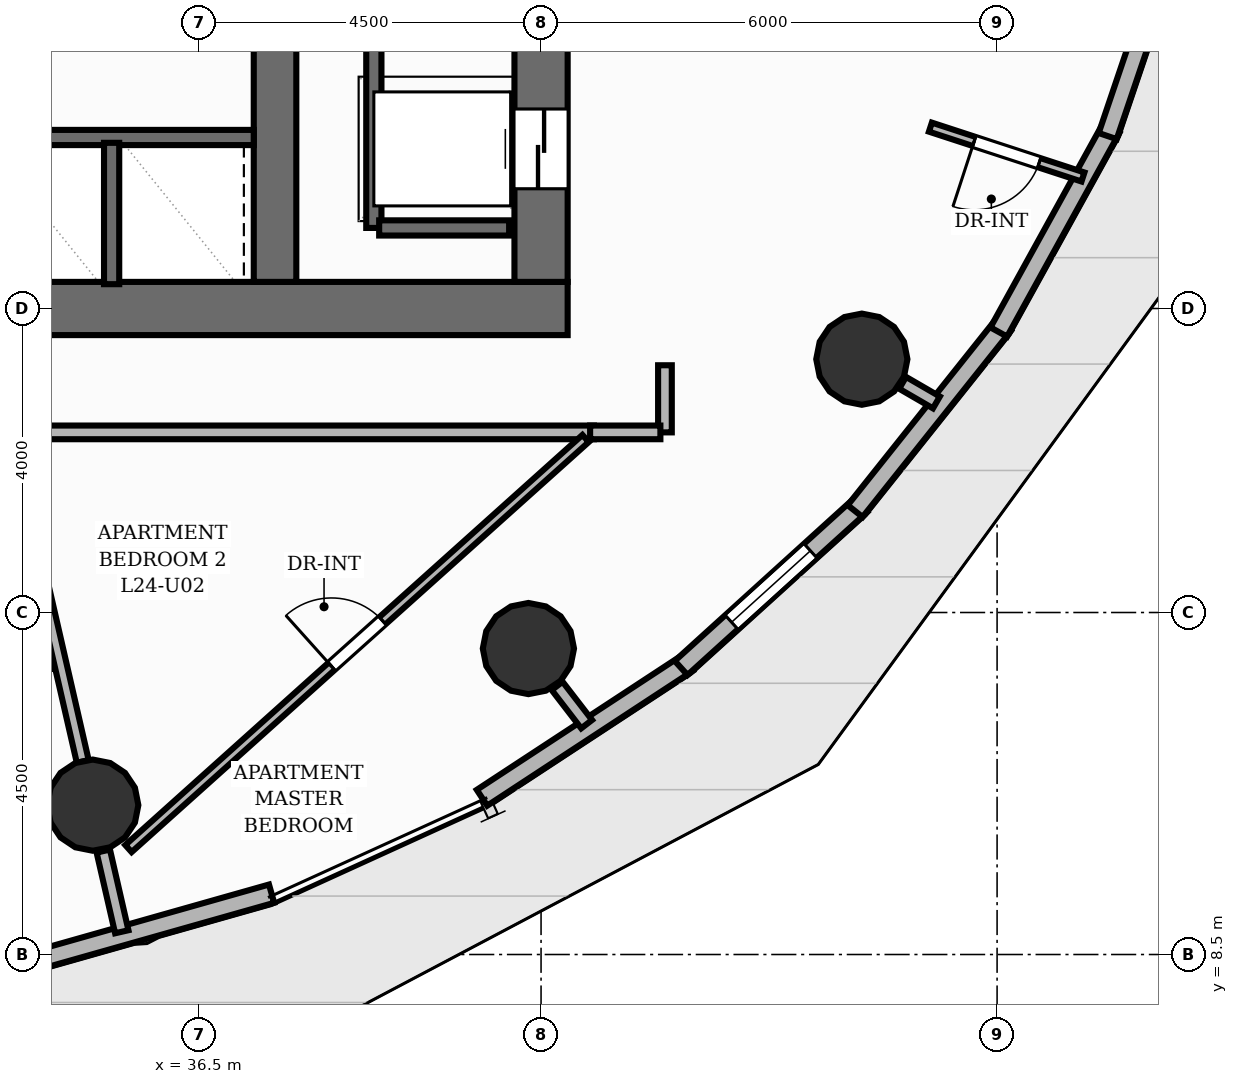
"""IFC4 building model, lengths in metres.
Left out: names, types, materials, properties, quantities, classifications, styles, units other than length and angle.
Written with IfcOpenShell. Run it as: python <this file> out.ifc"""

import sys

from ifc_helpers import new_model, si_unit, direction, frame, frame_2d, origin, origin_2d, place, context, subcontext, project, spatial, rectangle, circle, extrude, element, fill, save


model = new_model("IFC4")
c1 = context("Model", 3, precision=1e-05, world=origin(), true_north=direction((0.0, 1.0)))
c2 = subcontext(c1, "Body", "Model", "MODEL_VIEW")
j1 = project(units=[si_unit("LENGTHUNIT", "METRE"), si_unit("PLANEANGLEUNIT", "RADIAN")], contexts=[c1])
p1 = place(None, origin())
s1 = spatial("IfcSite", under=j1, at=p1, CompositionType="ELEMENT")
p2 = place(p1, origin())
s2 = spatial("IfcBuilding", under=s1, at=p2, CompositionType="ELEMENT")
p3 = place(p2, frame((0.0, 0.0, 83.68)))
s3 = spatial("IfcBuildingStorey", under=s2, at=p3, CompositionType="ELEMENT", Elevation=83.68)
p4 = place(p3, frame((22.65, 17.0, 0.0), z_axis=(0.0, 0.0, 1.0), x_axis=(1.0, 0.0, 0.0)))
e1 = element("IfcWall", 1, at=p4, inside=s3, PredefinedType="SHEAR", context=c2, shape_type="SweptSolid", body=[
    extrude(rectangle(XDim=18.7, YDim=0.7, at=frame_2d((9.35, 0.0))), origin(), (0.0, 0.0, 1.0), 3.2),
])
p5 = place(p4, frame((5.85, 0.0, 0.0)))
e2 = element("IfcOpeningElement", 2, at=p5, cuts=e1, PredefinedType="OPENING", context=c2, shape_type="SweptSolid", body=[
    extrude(rectangle(XDim=1.1, YDim=2.15, at=frame_2d((0.55, 1.075))), frame((0.0, 0.36, 0.0), z_axis=(0.0, -1.0, 0.0), x_axis=(1.0, 0.0, 0.0)), (0.0, 0.0, 1.0), 0.72),
])
p6 = place(p4, frame((9.4, 0.0, 0.0)))
e3 = element("IfcOpeningElement", 3, at=p6, cuts=e1, PredefinedType="OPENING", context=c2, shape_type="SweptSolid", body=[
    extrude(rectangle(XDim=0.9, YDim=2.1, at=frame_2d((0.45, 1.05))), frame((0.0, 0.36, 0.0), z_axis=(0.0, -1.0, 0.0), x_axis=(1.0, 0.0, 0.0)), (0.0, 0.0, 1.0), 0.72),
])
p7 = place(p3, frame((41.0, 17.35, 0.0), z_axis=(0.0, 0.0, 1.0), x_axis=(0.0, 1.0, 0.0)))
e4 = element("IfcWall", 4, at=p7, inside=s3, PredefinedType="SHEAR", context=c2, shape_type="SweptSolid", body=[
    extrude(rectangle(XDim=13.3, YDim=0.7, at=frame_2d((6.65, 0.0))), origin(), (0.0, 0.0, 1.0), 3.2),
])
p8 = place(p7, frame((1.225, 0.0, 0.0)))
e5 = element("IfcOpeningElement", 5, at=p8, cuts=e4, PredefinedType="OPENING", context=c2, shape_type="SweptSolid", body=[
    extrude(rectangle(XDim=1.05, YDim=2.15, at=frame_2d((0.525, 1.075))), frame((0.0, 0.36, 0.0), z_axis=(0.0, -1.0, 0.0), x_axis=(1.0, 0.0, 0.0)), (0.0, 0.0, 1.0), 0.72),
])
p9 = place(p7, frame((4.475, 0.0, 0.0)))
e6 = element("IfcOpeningElement", 6, at=p9, cuts=e4, PredefinedType="OPENING", context=c2, shape_type="SweptSolid", body=[
    extrude(rectangle(XDim=1.05, YDim=2.15, at=frame_2d((0.525, 1.075))), frame((0.0, 0.36, 0.0), z_axis=(0.0, -1.0, 0.0), x_axis=(1.0, 0.0, 0.0)), (0.0, 0.0, 1.0), 0.72),
])
p10 = place(p7, frame((7.775, 0.0, 0.0)))
e7 = element("IfcOpeningElement", 7, at=p10, cuts=e4, PredefinedType="OPENING", context=c2, shape_type="SweptSolid", body=[
    extrude(rectangle(XDim=1.05, YDim=2.15, at=frame_2d((0.525, 1.075))), frame((0.0, 0.36, 0.0), z_axis=(0.0, -1.0, 0.0), x_axis=(1.0, 0.0, 0.0)), (0.0, 0.0, 1.0), 0.72),
])
p11 = place(p7, frame((11.025, 0.0, 0.0)))
e8 = element("IfcOpeningElement", 8, at=p11, cuts=e4, PredefinedType="OPENING", context=c2, shape_type="SweptSolid", body=[
    extrude(rectangle(XDim=1.05, YDim=2.15, at=frame_2d((0.525, 1.075))), frame((0.0, 0.36, 0.0), z_axis=(0.0, -1.0, 0.0), x_axis=(1.0, 0.0, 0.0)), (0.0, 0.0, 1.0), 0.72),
])
p12 = place(p3, frame((37.5, 17.35, 0.0), z_axis=(0.0, 0.0, 1.0), x_axis=(0.0, 1.0, 0.0)))
e9 = element("IfcWall", 9, at=p12, inside=s3, PredefinedType="SHEAR", context=c2, shape_type="SweptSolid", body=[
    extrude(rectangle(XDim=13.3, YDim=0.56, at=frame_2d((6.65, 0.0))), origin(), (0.0, 0.0, 1.0), 3.2),
])
for number, where, z_axis, x_axis in (
    (10, (35.102, 10.465, 0.0), (0.0, 0.0, 1.0), (1.0, 0.0, 0.0)),
    (11, (40.833, 12.526, 0.0), (0.0, 0.0, 1.0), (1.0, 0.0, 0.0)),
    (12, (45.22, 16.333, 0.0), (0.0, 0.0, 1.0), (1.0, 0.0, 0.0)),
):
    element("IfcColumn", number, at=place(p3, frame(where, z_axis=z_axis, x_axis=x_axis)), inside=s3, PredefinedType="COLUMN", context=c2, shape_type="SweptSolid", body=[
        extrude(circle(Radius=0.6, at=origin_2d()), origin(), (0.0, 0.0, 1.0), 3.2),
    ])
p13 = place(p3, frame((37.455, 9.301, 0.0), z_axis=(0.0, 0.0, 1.0), x_axis=(-0.962134911526, -0.272573681825, 0.0)))
e13 = element("IfcWall", 13, at=p13, inside=s3, PredefinedType="SOLIDWALL", context=c2, shape_type="SweptSolid", body=[
    extrude(rectangle(XDim=3.26, YDim=0.25, at=frame_2d((1.63, 0.0))), origin(), (0.0, 0.0, 1.0), 2.96),
])
p14 = place(p3, frame((42.929, 12.337, 0.0), z_axis=(0.0, 0.0, 1.0), x_axis=(-0.836273856728, -0.548311988336, 0.0)))
e14 = element("IfcWall", 14, at=p14, inside=s3, PredefinedType="SOLIDWALL", context=c2, shape_type="SweptSolid", body=[
    extrude(rectangle(XDim=3.236, YDim=0.25, at=frame_2d((1.618, 0.0))), origin(), (0.0, 0.0, 1.0), 2.96),
])
p15 = place(p3, frame((45.208, 14.414, 0.0), z_axis=(0.0, 0.0, 1.0), x_axis=(-0.740832321657, -0.671690011232, 0.0)))
e15 = element("IfcWall", 15, at=p15, inside=s3, PredefinedType="SOLIDWALL", context=c2, shape_type="SweptSolid", body=[
    extrude(rectangle(XDim=3.192, YDim=0.25, at=frame_2d((1.596, 0.0))), origin(), (0.0, 0.0, 1.0), 2.96),
])
p16 = place(p15, frame((0.896, 0.0, 0.85)))
e16 = element("IfcOpeningElement", 16, at=p16, cuts=e15, PredefinedType="OPENING", context=c2, shape_type="SweptSolid", body=[
    extrude(rectangle(XDim=1.4, YDim=1.55, at=frame_2d((0.7, 0.775))), frame((0.0, 0.135, 0.0), z_axis=(0.0, -1.0, 0.0), x_axis=(1.0, 0.0, 0.0)), (0.0, 0.0, 1.0), 0.27),
])
p17 = place(p3, frame((47.084, 16.783, 0.0), z_axis=(0.0, 0.0, 1.0), x_axis=(-0.623134406496, -0.782114768714, 0.0)))
e17 = element("IfcWall", 17, at=p17, inside=s3, PredefinedType="SOLIDWALL", context=c2, shape_type="SweptSolid", body=[
    extrude(rectangle(XDim=3.131, YDim=0.25, at=frame_2d((1.565, 0.0))), origin(), (0.0, 0.0, 1.0), 2.96),
])
p18 = place(p3, frame((48.5, 19.371, 0.0), z_axis=(0.0, 0.0, 1.0), x_axis=(-0.482904421948, -0.875673066426, 0.0)))
e18 = element("IfcWall", 18, at=p18, inside=s3, PredefinedType="SOLIDWALL", context=c2, shape_type="SweptSolid", body=[
    extrude(rectangle(XDim=3.061, YDim=0.25, at=frame_2d((1.53, 0.0))), origin(), (0.0, 0.0, 1.0), 2.96),
])
p19 = place(p3, frame((49.415, 22.099, 0.0), z_axis=(0.0, 0.0, 1.0), x_axis=(-0.321149814784, -0.947028403198, 0.0)))
e19 = element("IfcWall", 19, at=p19, inside=s3, PredefinedType="SOLIDWALL", context=c2, shape_type="SweptSolid", body=[
    extrude(rectangle(XDim=2.988, YDim=0.25, at=frame_2d((1.494, 0.0))), origin(), (0.0, 0.0, 1.0), 2.96),
])
p20 = place(p3, frame((38.8, 18.06, 0.0), z_axis=(0.0, 0.0, 1.0), x_axis=(0.0, 1.0, 0.0)))
e20 = element("IfcWall", 20, at=p20, inside=s3, PredefinedType="SHEAR", context=c2, shape_type="SweptSolid", body=[
    extrude(rectangle(XDim=11.88, YDim=0.2, at=frame_2d((5.94, 0.0))), origin(), (0.0, 0.0, 1.0), 3.2),
])
p21 = place(p3, frame((38.87, 18.06, 0.0), z_axis=(0.0, 0.0, 1.0), x_axis=(1.0, 0.0, 0.0)))
e21 = element("IfcWall", 21, at=p21, inside=s3, PredefinedType="SHEAR", context=c2, shape_type="SweptSolid", body=[
    extrude(rectangle(XDim=1.71, YDim=0.2, at=frame_2d((0.855, 0.0))), origin(), (0.0, 0.0, 1.0), 3.2),
])
p22 = place(p3, frame((33.5, 19.25, 0.0), z_axis=(0.0, 0.0, 1.0), x_axis=(1.0, 0.0, 0.0)))
e22 = element("IfcWall", 22, at=p22, inside=s3, PredefinedType="SHEAR", context=c2, shape_type="SweptSolid", body=[
    extrude(rectangle(XDim=3.72, YDim=0.2, at=frame_2d((1.86, 0.0))), origin(), (0.0, 0.0, 1.0), 3.2),
])
p23 = place(p3, frame((35.35, 17.32, 0.0), z_axis=(0.0, 0.0, 1.0), x_axis=(0.0, 1.0, 0.0)))
e23 = element("IfcWall", 23, at=p23, inside=s3, PredefinedType="SHEAR", context=c2, shape_type="SweptSolid", body=[
    extrude(rectangle(XDim=1.86, YDim=0.2, at=frame_2d((0.93, 0.0))), origin(), (0.0, 0.0, 1.0), 3.2),
])
p24 = place(p3, frame((35.24, 9.861, 0.0), z_axis=(0.0, 0.0, 1.0), x_axis=(0.223287406217, -0.974752652843, 0.0)))
e24 = element("IfcWall", 24, at=p24, inside=s3, PredefinedType="PARTITIONING", context=c2, shape_type="SweptSolid", body=[
    extrude(rectangle(XDim=1.089, YDim=0.18, at=frame_2d((0.544, 0.0))), origin(), (0.0, 0.0, 1.0), 2.261),
])
p25 = place(p3, frame((41.212, 12.034, 0.0), z_axis=(0.0, 0.0, 1.0), x_axis=(0.609970610867, -0.792424036661, 0.0)))
e25 = element("IfcWall", 25, at=p25, inside=s3, PredefinedType="PARTITIONING", context=c2, shape_type="SweptSolid", body=[
    extrude(rectangle(XDim=0.635, YDim=0.18, at=frame_2d((0.318, 0.0))), origin(), (0.0, 0.0, 1.0), 2.261),
])
p26 = place(p3, frame((45.757, 16.022, 0.0), z_axis=(0.0, 0.0, 1.0), x_axis=(0.864981735625, -0.501803344981, 0.0)))
e26 = element("IfcWall", 26, at=p26, inside=s3, PredefinedType="PARTITIONING", context=c2, shape_type="SweptSolid", body=[
    extrude(rectangle(XDim=0.514, YDim=0.18, at=frame_2d((0.257, 0.0))), origin(), (0.0, 0.0, 1.0), 2.261),
])
p27 = place(p3, frame((41.695, 15.37, 0.0), z_axis=(0.0, 0.0, 1.0), x_axis=(-1.0, 0.0, 0.0)))
e27 = element("IfcWall", 27, at=p27, inside=s3, PredefinedType="PARTITIONING", context=c2, shape_type="SweptSolid", body=[
    extrude(rectangle(XDim=20.325, YDim=0.18, at=frame_2d((10.163, 0.0))), origin(), (0.0, 0.0, 1.0), 2.955),
])
p28 = place(p27, frame((11.424, 0.0, 0.0)))
e28 = element("IfcOpeningElement", 28, at=p28, cuts=e27, PredefinedType="OPENING", context=c2, shape_type="SweptSolid", body=[
    extrude(rectangle(XDim=1.05, YDim=2.15, at=frame_2d((0.525, 1.075))), frame((0.0, 0.1, 0.0), z_axis=(0.0, -1.0, 0.0), x_axis=(1.0, 0.0, 0.0)), (0.0, 0.0, 1.0), 0.2),
])
p29 = place(p3, frame((42.63, 16.253, 0.0), z_axis=(0.0, 0.0, 1.0), x_axis=(0.0, -1.0, 0.0)))
e29 = element("IfcWall", 29, at=p29, inside=s3, PredefinedType="PARTITIONING", context=c2, shape_type="SweptSolid", body=[
    extrude(rectangle(XDim=0.883, YDim=0.18, at=frame_2d((0.441, 0.0))), origin(), (0.0, 0.0, 1.0), 2.955),
])
p30 = place(p3, frame((42.57, 15.37, 0.0), z_axis=(0.0, 0.0, 1.0), x_axis=(-1.0, 0.0, 0.0)))
e30 = element("IfcWall", 30, at=p30, inside=s3, PredefinedType="PARTITIONING", context=c2, shape_type="SweptSolid", body=[
    extrude(rectangle(XDim=0.925, YDim=0.18, at=frame_2d((0.462, 0.0))), origin(), (0.0, 0.0, 1.0), 2.955),
])
p31 = place(p3, frame((31.077, 12.707, 0.0), z_axis=(0.0, 0.0, 1.0), x_axis=(0.994472124215, -0.105000924563, 0.0)))
e31 = element("IfcWall", 31, at=p31, inside=s3, PredefinedType="PLUMBINGWALL", context=c2, shape_type="SweptSolid", body=[
    extrude(rectangle(XDim=3.618, YDim=0.16, at=frame_2d((1.809, 0.0))), origin(), (0.0, 0.0, 1.0), 2.955),
])
p32 = place(p3, frame((33.978, 15.37, 0.0), z_axis=(0.0, 0.0, 1.0), x_axis=(0.223321757884, -0.974744783241, 0.0)))
e32 = element("IfcWall", 32, at=p32, inside=s3, PredefinedType="PLUMBINGWALL", context=c2, shape_type="SweptSolid", body=[
    extrude(rectangle(XDim=4.442, YDim=0.16, at=frame_2d((2.221, 0.0))), origin(), (0.0, 0.0, 1.0), 2.261),
])
p33 = place(p3, frame((48.13, 18.73, 0.0), z_axis=(0.0, 0.0, 1.0), x_axis=(-0.950573429935, 0.310499845896, 0.0)))
e33 = element("IfcWall", 33, at=p33, inside=s3, PredefinedType="PARTITIONING", context=c2, shape_type="SweptSolid", body=[
    extrude(rectangle(XDim=2.112, YDim=0.125, at=frame_2d((1.056, 0.0))), origin(), (0.0, 0.0, 1.0), 2.955),
])
p34 = place(p33, frame((0.606, 0.0, 0.0)))
e34 = element("IfcOpeningElement", 34, at=p34, cuts=e33, PredefinedType="OPENING", context=c2, shape_type="SweptSolid", body=[
    extrude(rectangle(XDim=0.9, YDim=2.1, at=frame_2d((0.45, 1.05))), frame((0.0, 0.073, 0.0), z_axis=(0.0, -1.0, 0.0), x_axis=(1.0, 0.0, 0.0)), (0.0, 0.0, 1.0), 0.145),
])
p35 = place(p3, frame((35.571, 9.894, 0.0), z_axis=(0.0, 0.0, 1.0), x_axis=(0.744379363772, 0.667756963865, 0.0)))
e35 = element("IfcWall", 35, at=p35, inside=s3, PredefinedType="PARTITIONING", context=c2, shape_type="SweptSolid", body=[
    extrude(rectangle(XDim=8.08, YDim=0.125, at=frame_2d((4.04, 0.0))), origin(), (0.0, 0.0, 1.0), 2.404),
])
p36 = place(p35, frame((3.59, 0.0, 0.0)))
e36 = element("IfcOpeningElement", 36, at=p36, cuts=e35, PredefinedType="OPENING", context=c2, shape_type="SweptSolid", body=[
    extrude(rectangle(XDim=0.9, YDim=2.1, at=frame_2d((0.45, 1.05))), frame((0.0, 0.073, 0.0), z_axis=(0.0, -1.0, 0.0), x_axis=(1.0, 0.0, 0.0)), (0.0, 0.0, 1.0), 0.145),
])
p37 = place(p16, origin())
e37 = element("IfcWindow", 37, at=p37, inside=s3, PartitioningType="SINGLE_PANEL", PredefinedType="WINDOW", context=c2, shape_type="SweptSolid", body=[
    extrude(rectangle(XDim=1.4, YDim=1.55, at=frame_2d((0.7, 0.775))), frame((0.0, 0.03, 0.0), z_axis=(0.0, -1.0, 0.0), x_axis=(1.0, 0.0, 0.0)), (0.0, 0.0, 1.0), 0.06),
])
fill(e16, e37)
p38 = place(p8, origin())
e38 = element("IfcDoor", 38, at=p38, inside=s3, OperationType="DOUBLE_DOOR_SLIDING", PredefinedType="DOOR", context=c2, shape_type="SweptSolid", body=[
    extrude(rectangle(XDim=1.05, YDim=2.15, at=frame_2d((0.525, 1.075))), frame((0.0, 0.025, 0.0), z_axis=(0.0, -1.0, 0.0), x_axis=(1.0, 0.0, 0.0)), (0.0, 0.0, 1.0), 0.05),
])
fill(e5, e38)
p39 = place(p34, origin())
e39 = element("IfcDoor", 39, at=p39, inside=s3, OperationType="SINGLE_SWING_RIGHT", PredefinedType="DOOR", context=c2, shape_type="SweptSolid", body=[
    extrude(rectangle(XDim=0.9, YDim=2.1, at=frame_2d((0.45, 1.05))), frame((0.0, 0.025, 0.0), z_axis=(0.0, -1.0, 0.0), x_axis=(1.0, 0.0, 0.0)), (0.0, 0.0, 1.0), 0.05),
])
fill(e34, e39)
p40 = place(p36, origin())
e40 = element("IfcDoor", 40, at=p40, inside=s3, OperationType="SINGLE_SWING_LEFT", PredefinedType="DOOR", context=c2, shape_type="SweptSolid", body=[
    extrude(rectangle(XDim=0.9, YDim=2.1, at=frame_2d((0.45, 1.05))), frame((0.0, 0.025, 0.0), z_axis=(0.0, -1.0, 0.0), x_axis=(1.0, 0.0, 0.0)), (0.0, 0.0, 1.0), 0.05),
])
fill(e36, e40)
save(model, sys.argv[1])
